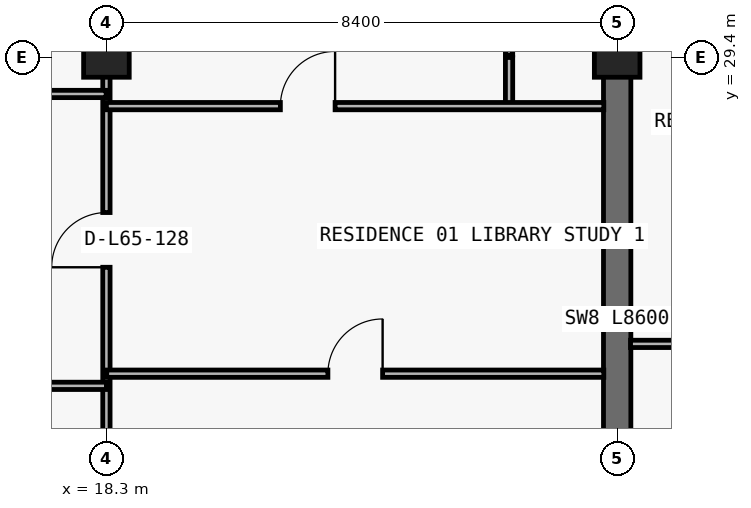
"""IFC4 building model, lengths in metres.
Left out: names, types, materials, properties, quantities, classifications, styles, units other than length and angle.
Written with IfcOpenShell. Run it as: python <this file> out.ifc"""

import sys

from ifc_helpers import new_model, si_unit, direction, frame, frame_2d, origin, origin_2d, place, context, subcontext, project, spatial, rectangle, extrude, element, fill, save


model = new_model("IFC4")
c1 = context("Model", 3, precision=1e-05, world=origin(), true_north=direction((0.0, 1.0)))
c2 = subcontext(c1, "Body", "Model", "MODEL_VIEW")
j1 = project(units=[si_unit("LENGTHUNIT", "METRE"), si_unit("PLANEANGLEUNIT", "RADIAN")], contexts=[c1])
p1 = place(None, origin())
s1 = spatial("IfcSite", under=j1, at=p1, CompositionType="ELEMENT")
p2 = place(p1, origin())
s2 = spatial("IfcBuilding", under=s1, at=p2, CompositionType="ELEMENT")
p3 = place(p2, frame((0.0, 0.0, 233.1)))
s3 = spatial("IfcBuildingStorey", under=s2, at=p3, CompositionType="ELEMENT", Elevation=233.1)
for number, where, z_axis, x_axis in (
    (1, (18.3, 29.4, 0.0), (0.0, 0.0, 1.0), (1.0, 0.0, 0.0)),
    (2, (26.7, 29.4, 0.0), (0.0, 0.0, 1.0), (1.0, 0.0, 0.0)),
):
    element("IfcColumn", number, at=place(p3, frame(where, z_axis=z_axis, x_axis=x_axis)), inside=s3, PredefinedType="COLUMN", context=c2, shape_type="SweptSolid", body=[
        extrude(rectangle(XDim=0.75, YDim=0.65, at=origin_2d()), origin(), (0.0, 0.0, 1.0), 3.05),
    ])
p4 = place(p3, frame((26.7, 20.8, 0.0), z_axis=(0.0, 0.0, 1.0), x_axis=(0.0, 1.0, 0.0)))
e3 = element("IfcWall", 3, at=p4, inside=s3, PredefinedType="SHEAR", context=c2, shape_type="SweptSolid", body=[
    extrude(rectangle(XDim=8.6, YDim=0.45, at=frame_2d((4.3, 0.0))), origin(), (0.0, 0.0, 1.0), 3.05),
])
p5 = place(p3, frame((18.3, 13.34, 0.0), z_axis=(0.0, 0.0, 1.0), x_axis=(0.0, 1.0, 0.0)))
e4 = element("IfcWall", 4, at=p5, inside=s3, PredefinedType="PARTITIONING", context=c2, shape_type="SweptSolid", body=[
    extrude(rectangle(XDim=16.06, YDim=0.12, at=frame_2d((8.03, 0.0))), origin(), (0.0, 0.0, 1.0), 2.263),
])
p6 = place(p5, frame((12.61, 0.0, 0.0)))
e5 = element("IfcOpeningElement", 5, at=p6, cuts=e4, PredefinedType="OPENING", context=c2, shape_type="SweptSolid", body=[
    extrude(rectangle(XDim=0.9, YDim=2.15, at=frame_2d((0.45, 1.075))), frame((0.0, 0.07, 0.0), z_axis=(0.0, -1.0, 0.0), x_axis=(1.0, 0.0, 0.0)), (0.0, 0.0, 1.0), 0.14),
])
p7 = place(p3, frame((18.3, 29.44, 0.0), z_axis=(0.0, 0.0, 1.0), x_axis=(0.0, 1.0, 0.0)))
e6 = element("IfcWall", 6, at=p7, inside=s3, PredefinedType="PARTITIONING", context=c2, shape_type="SweptSolid", body=[
    extrude(rectangle(XDim=4.56, YDim=0.12, at=frame_2d((2.28, 0.0))), origin(), (0.0, 0.0, 1.0), 2.263),
])
p8 = place(p3, frame((24.922, 28.6, 0.0), z_axis=(0.0, 0.0, 1.0), x_axis=(0.0, 1.0, 0.0)))
e7 = element("IfcWall", 7, at=p8, inside=s3, PredefinedType="PARTITIONING", context=c2, shape_type="SweptSolid", body=[
    extrude(rectangle(XDim=0.8, YDim=0.12, at=frame_2d((0.4, 0.0))), origin(), (0.0, 0.0, 1.0), 3.05),
])
p9 = place(p3, frame((24.922, 29.44, 0.0), z_axis=(0.0, 0.0, 1.0), x_axis=(0.0, 1.0, 0.0)))
e8 = element("IfcWall", 8, at=p9, inside=s3, PredefinedType="PARTITIONING", context=c2, shape_type="SweptSolid", body=[
    extrude(rectangle(XDim=4.56, YDim=0.12, at=frame_2d((2.28, 0.0))), origin(), (0.0, 0.0, 1.0), 3.05),
])
p10 = place(p9, frame((1.855, 0.0, 0.0)))
e9 = element("IfcOpeningElement", 9, at=p10, cuts=e8, PredefinedType="OPENING", context=c2, shape_type="SweptSolid", body=[
    extrude(rectangle(XDim=0.85, YDim=2.1, at=frame_2d((0.425, 1.05))), frame((0.0, 0.07, 0.0), z_axis=(0.0, -1.0, 0.0), x_axis=(1.0, 0.0, 0.0)), (0.0, 0.0, 1.0), 0.14),
])
p11 = place(p3, frame((26.7, 29.44, 0.0), z_axis=(0.0, 0.0, 1.0), x_axis=(0.0, 1.0, 0.0)))
e10 = element("IfcWall", 10, at=p11, inside=s3, PredefinedType="PARTITIONING", context=c2, shape_type="SweptSolid", body=[
    extrude(rectangle(XDim=4.56, YDim=0.2, at=frame_2d((2.28, 0.0))), origin(), (0.0, 0.0, 1.0), 2.335),
])
p12 = place(p3, frame((12.1, 24.0, 0.0), z_axis=(0.0, 0.0, 1.0), x_axis=(1.0, 0.0, 0.0)))
e11 = element("IfcWall", 11, at=p12, inside=s3, PredefinedType="PARTITIONING", context=c2, shape_type="SweptSolid", body=[
    extrude(rectangle(XDim=6.2, YDim=0.12, at=frame_2d((3.1, 0.0))), origin(), (0.0, 0.0, 1.0), 3.05),
])
p13 = place(p12, frame((2.65, 0.0, 0.0)))
e12 = element("IfcOpeningElement", 12, at=p13, cuts=e11, PredefinedType="OPENING", context=c2, shape_type="SweptSolid", body=[
    extrude(rectangle(XDim=0.9, YDim=2.15, at=frame_2d((0.45, 1.075))), frame((0.0, 0.07, 0.0), z_axis=(0.0, -1.0, 0.0), x_axis=(1.0, 0.0, 0.0)), (0.0, 0.0, 1.0), 0.14),
])
p14 = place(p3, frame((18.305, 24.2, 0.0), z_axis=(0.0, 0.0, 1.0), x_axis=(1.0, 0.0, 0.0)))
e13 = element("IfcWall", 13, at=p14, inside=s3, PredefinedType="PARTITIONING", context=c2, shape_type="SweptSolid", body=[
    extrude(rectangle(XDim=8.175, YDim=0.12, at=frame_2d((4.087, 0.0))), origin(), (0.0, 0.0, 1.0), 3.05),
])
p15 = place(p14, frame((3.637, 0.0, 0.0)))
e14 = element("IfcOpeningElement", 14, at=p15, cuts=e13, PredefinedType="OPENING", context=c2, shape_type="SweptSolid", body=[
    extrude(rectangle(XDim=0.9, YDim=2.15, at=frame_2d((0.45, 1.075))), frame((0.0, 0.07, 0.0), z_axis=(0.0, -1.0, 0.0), x_axis=(1.0, 0.0, 0.0)), (0.0, 0.0, 1.0), 0.14),
])
p16 = place(p3, frame((26.92, 24.69, 0.0), z_axis=(0.0, 0.0, 1.0), x_axis=(1.0, 0.0, 0.0)))
e15 = element("IfcWall", 15, at=p16, inside=s3, PredefinedType="PARTITIONING", context=c2, shape_type="SweptSolid", body=[
    extrude(rectangle(XDim=4.4, YDim=0.12, at=frame_2d((2.2, 0.0))), origin(), (0.0, 0.0, 1.0), 3.05),
])
p17 = place(p16, frame((1.583, 0.0, 0.0)))
e16 = element("IfcOpeningElement", 16, at=p17, cuts=e15, PredefinedType="OPENING", context=c2, shape_type="SweptSolid", body=[
    extrude(rectangle(XDim=0.9, YDim=2.15, at=frame_2d((0.45, 1.075))), frame((0.0, 0.07, 0.0), z_axis=(0.0, -1.0, 0.0), x_axis=(1.0, 0.0, 0.0)), (0.0, 0.0, 1.0), 0.14),
])
p18 = place(p3, frame((18.3, 28.6, 0.0), z_axis=(0.0, 0.0, 1.0), x_axis=(1.0, 0.0, 0.0)))
e17 = element("IfcWall", 17, at=p18, inside=s3, PredefinedType="PARTITIONING", context=c2, shape_type="SweptSolid", body=[
    extrude(rectangle(XDim=8.18, YDim=0.12, at=frame_2d((4.09, 0.0))), origin(), (0.0, 0.0, 1.0), 3.05),
])
p19 = place(p18, frame((2.861, 0.0, 0.0)))
e18 = element("IfcOpeningElement", 18, at=p19, cuts=e17, PredefinedType="OPENING", context=c2, shape_type="SweptSolid", body=[
    extrude(rectangle(XDim=0.9, YDim=2.15, at=frame_2d((0.45, 1.075))), frame((0.0, 0.07, 0.0), z_axis=(0.0, -1.0, 0.0), x_axis=(1.0, 0.0, 0.0)), (0.0, 0.0, 1.0), 0.14),
])
p20 = place(p3, frame((12.1, 28.8, 0.0), z_axis=(0.0, 0.0, 1.0), x_axis=(1.0, 0.0, 0.0)))
e19 = element("IfcWall", 19, at=p20, inside=s3, PredefinedType="PARTITIONING", context=c2, shape_type="SweptSolid", body=[
    extrude(rectangle(XDim=6.195, YDim=0.12, at=frame_2d((3.097, 0.0))), origin(), (0.0, 0.0, 1.0), 3.05),
])
p21 = place(p20, frame((1.659, 0.0, 0.0)))
e20 = element("IfcOpeningElement", 20, at=p21, cuts=e19, PredefinedType="OPENING", context=c2, shape_type="SweptSolid", body=[
    extrude(rectangle(XDim=0.9, YDim=2.15, at=frame_2d((0.45, 1.075))), frame((0.0, 0.07, 0.0), z_axis=(0.0, -1.0, 0.0), x_axis=(1.0, 0.0, 0.0)), (0.0, 0.0, 1.0), 0.14),
])
p22 = place(p6, origin())
e21 = element("IfcDoor", 21, at=p22, inside=s3, OperationType="SINGLE_SWING_LEFT", PredefinedType="DOOR", context=c2, shape_type="SweptSolid", body=[
    extrude(rectangle(XDim=0.9, YDim=2.15, at=frame_2d((0.45, 1.075))), frame((0.0, 0.025, 0.0), z_axis=(0.0, -1.0, 0.0), x_axis=(1.0, 0.0, 0.0)), (0.0, 0.0, 1.0), 0.05),
])
fill(e5, e21)
p23 = place(p19, origin())
e22 = element("IfcDoor", 22, at=p23, inside=s3, OperationType="SINGLE_SWING_RIGHT", PredefinedType="DOOR", context=c2, shape_type="SweptSolid", body=[
    extrude(rectangle(XDim=0.9, YDim=2.15, at=frame_2d((0.45, 1.075))), frame((0.0, 0.025, 0.0), z_axis=(0.0, -1.0, 0.0), x_axis=(1.0, 0.0, 0.0)), (0.0, 0.0, 1.0), 0.05),
])
fill(e18, e22)
p24 = place(p15, origin())
e23 = element("IfcDoor", 23, at=p24, inside=s3, OperationType="SINGLE_SWING_RIGHT", PredefinedType="DOOR", context=c2, shape_type="SweptSolid", body=[
    extrude(rectangle(XDim=0.9, YDim=2.15, at=frame_2d((0.45, 1.075))), frame((0.0, 0.025, 0.0), z_axis=(0.0, -1.0, 0.0), x_axis=(1.0, 0.0, 0.0)), (0.0, 0.0, 1.0), 0.05),
])
fill(e14, e23)
save(model, sys.argv[1])
